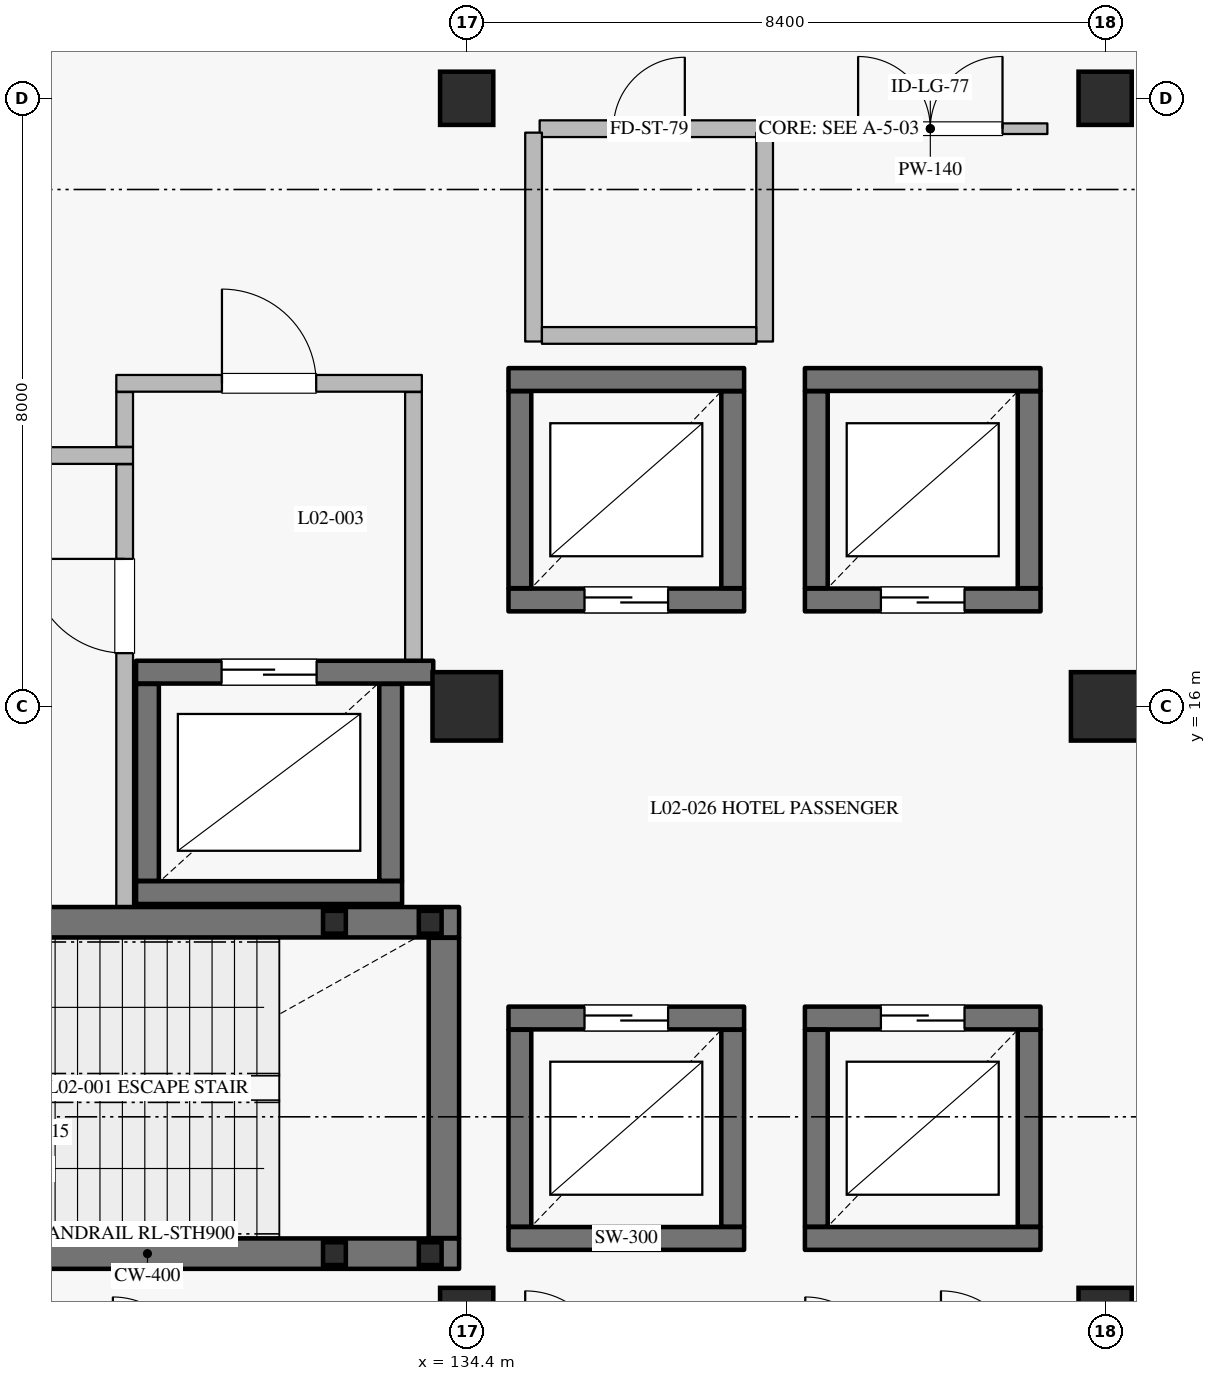
"""IFC4 building model, lengths in metres.
Left out: names, types, materials, properties, quantities, classifications, styles, units other than length and angle.
Written with IfcOpenShell. Run it as: python <this file> out.ifc"""

import sys

from ifc_helpers import new_model, si_unit, direction, frame, frame_2d, origin, origin_2d, place, context, subcontext, project, spatial, rectangle, hollow_rectangle, extrude, element, fill, save


model = new_model("IFC4")
c1 = context("Model", 3, precision=1e-05, world=origin(), true_north=direction((0.0, 1.0)))
c2 = subcontext(c1, "Body", "Model", "MODEL_VIEW")
j1 = project(units=[si_unit("LENGTHUNIT", "METRE"), si_unit("PLANEANGLEUNIT", "RADIAN")], contexts=[c1])
p1 = place(None, origin())
s1 = spatial("IfcSite", under=j1, at=p1, CompositionType="ELEMENT")
p2 = place(p1, origin())
s2 = spatial("IfcBuilding", under=s1, at=p2, CompositionType="ELEMENT")
p3 = place(p2, frame((0.0, 0.0, 11.4)))
s3 = spatial("IfcBuildingStorey", under=s2, at=p3, CompositionType="ELEMENT", Elevation=11.4)
for number, where, z_axis, x_axis in (
    (1, (134.4, 16.0, 0.0), (0.0, 0.0, 1.0), (1.0, 0.0, 0.0)),
    (2, (142.8, 16.0, 0.0), (0.0, 0.0, 1.0), (1.0, 0.0, 0.0)),
):
    element("IfcColumn", number, at=place(p3, frame(where, z_axis=z_axis, x_axis=x_axis)), inside=s3, PredefinedType="COLUMN", context=c2, shape_type="SweptSolid", body=[
        extrude(rectangle(XDim=0.9, YDim=0.9, at=origin_2d()), origin(), (0.0, 0.0, 1.0), 4.8),
    ])
for number, where, z_axis, x_axis in (
    (3, (134.4, 8.0, 0.0), (0.0, 0.0, 1.0), (1.0, 0.0, 0.0)),
    (4, (134.4, 24.0, 0.0), (0.0, 0.0, 1.0), (1.0, 0.0, 0.0)),
    (5, (142.8, 8.0, 0.0), (0.0, 0.0, 1.0), (1.0, 0.0, 0.0)),
    (6, (142.8, 24.0, 0.0), (0.0, 0.0, 1.0), (1.0, 0.0, 0.0)),
):
    element("IfcColumn", number, at=place(p3, frame(where, z_axis=z_axis, x_axis=x_axis)), inside=s3, PredefinedType="COLUMN", context=c2, shape_type="SweptSolid", body=[
        extrude(rectangle(XDim=0.7, YDim=0.7, at=origin_2d()), origin(), (0.0, 0.0, 1.0), 4.8),
    ])
p4 = place(p3, frame((134.95, 17.4, 0.0), z_axis=(0.0, 0.0, 1.0), x_axis=(1.0, 0.0, 0.0)))
e7 = element("IfcWall", 7, at=p4, inside=s3, PredefinedType="SHEAR", context=c2, shape_type="SweptSolid", body=[
    extrude(rectangle(XDim=3.1, YDim=0.3, at=frame_2d((1.55, 0.0))), origin(), (0.0, 0.0, 1.0), 4.535),
])
p5 = place(p4, frame((1.0, 0.0, 0.0)))
e8 = element("IfcOpeningElement", 8, at=p5, cuts=e7, PredefinedType="OPENING", context=c2, shape_type="SweptSolid", body=[
    extrude(rectangle(XDim=1.1, YDim=2.2, at=frame_2d((0.55, 1.1))), frame((0.0, 0.16, 0.0), z_axis=(0.0, -1.0, 0.0), x_axis=(1.0, 0.0, 0.0)), (0.0, 0.0, 1.0), 0.32),
])
p6 = place(p3, frame((137.9, 17.555, 0.0), z_axis=(0.0, 0.0, 1.0), x_axis=(0.0, 1.0, 0.0)))
e9 = element("IfcWall", 9, at=p6, inside=s3, PredefinedType="SHEAR", context=c2, shape_type="SweptSolid", body=[
    extrude(rectangle(XDim=2.59, YDim=0.3, at=frame_2d((1.295, 0.0))), origin(), (0.0, 0.0, 1.0), 4.535),
])
p7 = place(p3, frame((138.05, 20.3, 0.0), z_axis=(0.0, 0.0, 1.0), x_axis=(-1.0, 0.0, 0.0)))
e10 = element("IfcWall", 10, at=p7, inside=s3, PredefinedType="SHEAR", context=c2, shape_type="SweptSolid", body=[
    extrude(rectangle(XDim=3.1, YDim=0.3, at=frame_2d((1.55, 0.0))), origin(), (0.0, 0.0, 1.0), 4.535),
])
p8 = place(p3, frame((135.1, 20.145, 0.0), z_axis=(0.0, 0.0, 1.0), x_axis=(0.0, -1.0, 0.0)))
e11 = element("IfcWall", 11, at=p8, inside=s3, PredefinedType="SHEAR", context=c2, shape_type="SweptSolid", body=[
    extrude(rectangle(XDim=2.59, YDim=0.3, at=frame_2d((1.295, 0.0))), origin(), (0.0, 0.0, 1.0), 4.535),
])
p9 = place(p3, frame((138.85, 17.4, 0.0), z_axis=(0.0, 0.0, 1.0), x_axis=(1.0, 0.0, 0.0)))
e12 = element("IfcWall", 12, at=p9, inside=s3, PredefinedType="SHEAR", context=c2, shape_type="SweptSolid", body=[
    extrude(rectangle(XDim=3.1, YDim=0.3, at=frame_2d((1.55, 0.0))), origin(), (0.0, 0.0, 1.0), 4.535),
])
p10 = place(p9, frame((1.0, 0.0, 0.0)))
e13 = element("IfcOpeningElement", 13, at=p10, cuts=e12, PredefinedType="OPENING", context=c2, shape_type="SweptSolid", body=[
    extrude(rectangle(XDim=1.1, YDim=2.2, at=frame_2d((0.55, 1.1))), frame((0.0, 0.16, 0.0), z_axis=(0.0, -1.0, 0.0), x_axis=(1.0, 0.0, 0.0)), (0.0, 0.0, 1.0), 0.32),
])
p11 = place(p3, frame((141.8, 17.555, 0.0), z_axis=(0.0, 0.0, 1.0), x_axis=(0.0, 1.0, 0.0)))
e14 = element("IfcWall", 14, at=p11, inside=s3, PredefinedType="SHEAR", context=c2, shape_type="SweptSolid", body=[
    extrude(rectangle(XDim=2.59, YDim=0.3, at=frame_2d((1.295, 0.0))), origin(), (0.0, 0.0, 1.0), 4.535),
])
p12 = place(p3, frame((141.95, 20.3, 0.0), z_axis=(0.0, 0.0, 1.0), x_axis=(-1.0, 0.0, 0.0)))
e15 = element("IfcWall", 15, at=p12, inside=s3, PredefinedType="SHEAR", context=c2, shape_type="SweptSolid", body=[
    extrude(rectangle(XDim=3.1, YDim=0.3, at=frame_2d((1.55, 0.0))), origin(), (0.0, 0.0, 1.0), 4.535),
])
p13 = place(p3, frame((139.0, 20.145, 0.0), z_axis=(0.0, 0.0, 1.0), x_axis=(0.0, -1.0, 0.0)))
e16 = element("IfcWall", 16, at=p13, inside=s3, PredefinedType="SHEAR", context=c2, shape_type="SweptSolid", body=[
    extrude(rectangle(XDim=2.59, YDim=0.3, at=frame_2d((1.295, 0.0))), origin(), (0.0, 0.0, 1.0), 4.535),
])
p14 = place(p3, frame((134.95, 9.0, 0.0), z_axis=(0.0, 0.0, 1.0), x_axis=(1.0, 0.0, 0.0)))
e17 = element("IfcWall", 17, at=p14, inside=s3, PredefinedType="SHEAR", context=c2, shape_type="SweptSolid", body=[
    extrude(rectangle(XDim=3.1, YDim=0.3, at=frame_2d((1.55, 0.0))), origin(), (0.0, 0.0, 1.0), 4.535),
])
p15 = place(p3, frame((137.9, 9.155, 0.0), z_axis=(0.0, 0.0, 1.0), x_axis=(0.0, 1.0, 0.0)))
e18 = element("IfcWall", 18, at=p15, inside=s3, PredefinedType="SHEAR", context=c2, shape_type="SweptSolid", body=[
    extrude(rectangle(XDim=2.59, YDim=0.3, at=frame_2d((1.295, 0.0))), origin(), (0.0, 0.0, 1.0), 4.535),
])
p16 = place(p3, frame((138.05, 11.9, 0.0), z_axis=(0.0, 0.0, 1.0), x_axis=(-1.0, 0.0, 0.0)))
e19 = element("IfcWall", 19, at=p16, inside=s3, PredefinedType="SHEAR", context=c2, shape_type="SweptSolid", body=[
    extrude(rectangle(XDim=3.1, YDim=0.3, at=frame_2d((1.55, 0.0))), origin(), (0.0, 0.0, 1.0), 4.535),
])
p17 = place(p16, frame((1.0, 0.0, 0.0)))
e20 = element("IfcOpeningElement", 20, at=p17, cuts=e19, PredefinedType="OPENING", context=c2, shape_type="SweptSolid", body=[
    extrude(rectangle(XDim=1.1, YDim=2.2, at=frame_2d((0.55, 1.1))), frame((0.0, 0.16, 0.0), z_axis=(0.0, -1.0, 0.0), x_axis=(1.0, 0.0, 0.0)), (0.0, 0.0, 1.0), 0.32),
])
p18 = place(p3, frame((135.1, 11.745, 0.0), z_axis=(0.0, 0.0, 1.0), x_axis=(0.0, -1.0, 0.0)))
e21 = element("IfcWall", 21, at=p18, inside=s3, PredefinedType="SHEAR", context=c2, shape_type="SweptSolid", body=[
    extrude(rectangle(XDim=2.59, YDim=0.3, at=frame_2d((1.295, 0.0))), origin(), (0.0, 0.0, 1.0), 4.535),
])
p19 = place(p3, frame((138.85, 9.0, 0.0), z_axis=(0.0, 0.0, 1.0), x_axis=(1.0, 0.0, 0.0)))
e22 = element("IfcWall", 22, at=p19, inside=s3, PredefinedType="SHEAR", context=c2, shape_type="SweptSolid", body=[
    extrude(rectangle(XDim=3.1, YDim=0.3, at=frame_2d((1.55, 0.0))), origin(), (0.0, 0.0, 1.0), 4.535),
])
p20 = place(p3, frame((141.8, 9.155, 0.0), z_axis=(0.0, 0.0, 1.0), x_axis=(0.0, 1.0, 0.0)))
e23 = element("IfcWall", 23, at=p20, inside=s3, PredefinedType="SHEAR", context=c2, shape_type="SweptSolid", body=[
    extrude(rectangle(XDim=2.59, YDim=0.3, at=frame_2d((1.295, 0.0))), origin(), (0.0, 0.0, 1.0), 4.535),
])
p21 = place(p3, frame((141.95, 11.9, 0.0), z_axis=(0.0, 0.0, 1.0), x_axis=(-1.0, 0.0, 0.0)))
e24 = element("IfcWall", 24, at=p21, inside=s3, PredefinedType="SHEAR", context=c2, shape_type="SweptSolid", body=[
    extrude(rectangle(XDim=3.1, YDim=0.3, at=frame_2d((1.55, 0.0))), origin(), (0.0, 0.0, 1.0), 4.535),
])
p22 = place(p21, frame((1.0, 0.0, 0.0)))
e25 = element("IfcOpeningElement", 25, at=p22, cuts=e24, PredefinedType="OPENING", context=c2, shape_type="SweptSolid", body=[
    extrude(rectangle(XDim=1.1, YDim=2.2, at=frame_2d((0.55, 1.1))), frame((0.0, 0.16, 0.0), z_axis=(0.0, -1.0, 0.0), x_axis=(1.0, 0.0, 0.0)), (0.0, 0.0, 1.0), 0.32),
])
p23 = place(p3, frame((139.0, 11.745, 0.0), z_axis=(0.0, 0.0, 1.0), x_axis=(0.0, -1.0, 0.0)))
e26 = element("IfcWall", 26, at=p23, inside=s3, PredefinedType="SHEAR", context=c2, shape_type="SweptSolid", body=[
    extrude(rectangle(XDim=2.59, YDim=0.3, at=frame_2d((1.295, 0.0))), origin(), (0.0, 0.0, 1.0), 4.535),
])
p24 = place(p3, frame((130.05, 13.55, 0.0), z_axis=(0.0, 0.0, 1.0), x_axis=(1.0, 0.0, 0.0)))
e27 = element("IfcWall", 27, at=p24, inside=s3, PredefinedType="SHEAR", context=c2, shape_type="SweptSolid", body=[
    extrude(rectangle(XDim=3.5, YDim=0.3, at=frame_2d((1.75, 0.0))), origin(), (0.0, 0.0, 1.0), 4.535),
])
p25 = place(p3, frame((133.4, 13.705, 0.0), z_axis=(0.0, 0.0, 1.0), x_axis=(0.0, 1.0, 0.0)))
e28 = element("IfcWall", 28, at=p25, inside=s3, PredefinedType="SHEAR", context=c2, shape_type="SweptSolid", body=[
    extrude(rectangle(XDim=2.59, YDim=0.3, at=frame_2d((1.295, 0.0))), origin(), (0.0, 0.0, 1.0), 4.535),
])
p26 = place(p3, frame((133.96, 16.45, 0.0), z_axis=(0.0, 0.0, 1.0), x_axis=(-1.0, 0.0, 0.0)))
e29 = element("IfcWall", 29, at=p26, inside=s3, PredefinedType="SHEAR", context=c2, shape_type="SweptSolid", body=[
    extrude(rectangle(XDim=3.91, YDim=0.3, at=frame_2d((1.955, 0.0))), origin(), (0.0, 0.0, 1.0), 4.535),
])
p27 = place(p26, frame((1.535, 0.0, 0.0)))
e30 = element("IfcOpeningElement", 30, at=p27, cuts=e29, PredefinedType="OPENING", context=c2, shape_type="SweptSolid", body=[
    extrude(rectangle(XDim=1.25, YDim=2.25, at=frame_2d((0.625, 1.125))), frame((0.0, 0.16, 0.0), z_axis=(0.0, -1.0, 0.0), x_axis=(1.0, 0.0, 0.0)), (0.0, 0.0, 1.0), 0.32),
])
p28 = place(p3, frame((130.2, 16.295, 0.0), z_axis=(0.0, 0.0, 1.0), x_axis=(0.0, -1.0, 0.0)))
e31 = element("IfcWall", 31, at=p28, inside=s3, PredefinedType="SHEAR", context=c2, shape_type="SweptSolid", body=[
    extrude(rectangle(XDim=2.59, YDim=0.3, at=frame_2d((1.295, 0.0))), origin(), (0.0, 0.0, 1.0), 4.535),
])
p29 = place(p3, frame((126.1, 8.8, 0.0), z_axis=(0.0, 0.0, 1.0), x_axis=(1.0, 0.0, 0.0)))
e32 = element("IfcWall", 32, at=p29, inside=s3, PredefinedType="SHEAR", context=c2, shape_type="SweptSolid", body=[
    extrude(rectangle(XDim=8.2, YDim=0.4, at=frame_2d((4.1, 0.0))), origin(), (0.0, 0.0, 1.0), 4.535),
])
p30 = place(p3, frame((134.1, 9.005, 0.0), z_axis=(0.0, 0.0, 1.0), x_axis=(0.0, 1.0, 0.0)))
e33 = element("IfcWall", 33, at=p30, inside=s3, PredefinedType="SHEAR", context=c2, shape_type="SweptSolid", body=[
    extrude(rectangle(XDim=3.95, YDim=0.4, at=frame_2d((1.975, 0.0))), origin(), (0.0, 0.0, 1.0), 4.535),
])
p31 = place(p3, frame((126.1, 13.16, 0.0), z_axis=(0.0, 0.0, 1.0), x_axis=(1.0, 0.0, 0.0)))
e34 = element("IfcWall", 34, at=p31, inside=s3, PredefinedType="SHEAR", context=c2, shape_type="SweptSolid", body=[
    extrude(rectangle(XDim=8.2, YDim=0.4, at=frame_2d((4.1, 0.0))), origin(), (0.0, 0.0, 1.0), 4.535),
])
p32 = place(p31, frame((0.43, 0.0, 0.0)))
e35 = element("IfcOpeningElement", 35, at=p32, cuts=e34, PredefinedType="OPENING", context=c2, shape_type="SweptSolid", body=[
    extrude(rectangle(XDim=1.16, YDim=2.2, at=frame_2d((0.58, 1.1))), frame((0.0, 0.21, 0.0), z_axis=(0.0, -1.0, 0.0), x_axis=(1.0, 0.0, 0.0)), (0.0, 0.0, 1.0), 0.42),
])
p33 = place(p3, frame((126.19, 19.3, 0.0), z_axis=(0.0, 0.0, 1.0), x_axis=(1.0, 0.0, 0.0)))
e36 = element("IfcWall", 36, at=p33, inside=s3, PredefinedType="PARTITIONING", context=c2, shape_type="SweptSolid", body=[
    extrude(rectangle(XDim=3.82, YDim=0.22, at=frame_2d((1.91, 0.0))), origin(), (0.0, 0.0, 1.0), 4.535),
])
p34 = place(p33, frame((1.35, 0.0, 0.0)))
e37 = element("IfcOpeningElement", 37, at=p34, cuts=e36, PredefinedType="OPENING", context=c2, shape_type="SweptSolid", body=[
    extrude(rectangle(XDim=1.12, YDim=2.2, at=frame_2d((0.56, 1.1))), frame((0.0, 0.12, 0.0), z_axis=(0.0, -1.0, 0.0), x_axis=(1.0, 0.0, 0.0)), (0.0, 0.0, 1.0), 0.24),
])
p35 = place(p3, frame((129.9, 13.365, 0.0), z_axis=(0.0, 0.0, 1.0), x_axis=(0.0, 1.0, 0.0)))
e38 = element("IfcWall", 38, at=p35, inside=s3, PredefinedType="PARTITIONING", context=c2, shape_type="SweptSolid", body=[
    extrude(rectangle(XDim=5.82, YDim=0.22, at=frame_2d((2.91, 0.0))), origin(), (0.0, 0.0, 1.0), 4.535),
])
p36 = place(p35, frame((3.335, 0.0, 0.0)))
e39 = element("IfcOpeningElement", 39, at=p36, cuts=e38, PredefinedType="OPENING", context=c2, shape_type="SweptSolid", body=[
    extrude(rectangle(XDim=1.24, YDim=2.2, at=frame_2d((0.62, 1.1))), frame((0.0, 0.12, 0.0), z_axis=(0.0, -1.0, 0.0), x_axis=(1.0, 0.0, 0.0)), (0.0, 0.0, 1.0), 0.24),
])
p37 = place(p3, frame((129.9, 19.415, 0.0), z_axis=(0.0, 0.0, 1.0), x_axis=(0.0, 1.0, 0.0)))
e40 = element("IfcWall", 40, at=p37, inside=s3, PredefinedType="PARTITIONING", context=c2, shape_type="SweptSolid", body=[
    extrude(rectangle(XDim=0.72, YDim=0.22, at=frame_2d((0.36, 0.0))), origin(), (0.0, 0.0, 1.0), 4.535),
])
p38 = place(p3, frame((133.7, 16.605, 0.0), z_axis=(0.0, 0.0, 1.0), x_axis=(0.0, 1.0, 0.0)))
e41 = element("IfcWall", 41, at=p38, inside=s3, PredefinedType="PARTITIONING", context=c2, shape_type="SweptSolid", body=[
    extrude(rectangle(XDim=3.53, YDim=0.22, at=frame_2d((1.765, 0.0))), origin(), (0.0, 0.0, 1.0), 4.535),
])
p39 = place(p3, frame((129.79, 20.25, 0.0), z_axis=(0.0, 0.0, 1.0), x_axis=(1.0, 0.0, 0.0)))
e42 = element("IfcWall", 42, at=p39, inside=s3, PredefinedType="PARTITIONING", context=c2, shape_type="SweptSolid", body=[
    extrude(rectangle(XDim=4.02, YDim=0.22, at=frame_2d((2.01, 0.0))), origin(), (0.0, 0.0, 1.0), 4.535),
])
p40 = place(p39, frame((1.39, 0.0, 0.0)))
e43 = element("IfcOpeningElement", 43, at=p40, cuts=e42, PredefinedType="OPENING", context=c2, shape_type="SweptSolid", body=[
    extrude(rectangle(XDim=1.24, YDim=2.2, at=frame_2d((0.62, 1.1))), frame((0.0, 0.12, 0.0), z_axis=(0.0, -1.0, 0.0), x_axis=(1.0, 0.0, 0.0)), (0.0, 0.0, 1.0), 0.24),
])
for number, where, z_axis, x_axis in (
    (44, (132.66, 8.8, -2.7), (0.0, 0.0, 1.0), (1.0, 0.0, 0.0)),
    (45, (132.66, 13.16, -2.7), (0.0, 0.0, 1.0), (1.0, 0.0, 0.0)),
    (46, (133.92, 8.8, -2.7), (0.0, 0.0, 1.0), (1.0, 0.0, 0.0)),
    (47, (133.92, 13.16, -2.7), (0.0, 0.0, 1.0), (1.0, 0.0, 0.0)),
):
    element("IfcColumn", number, at=place(p3, frame(where, z_axis=z_axis, x_axis=x_axis)), inside=s3, PredefinedType="COLUMN", context=c2, shape_type="SweptSolid", body=[
        extrude(hollow_rectangle(XDim=0.3, YDim=0.3, WallThickness=0.012, at=origin_2d()), origin(), (0.0, 0.0, 1.0), 4.92),
    ])
p41 = place(p3, frame((138.96, 23.6, 0.0), z_axis=(0.0, 0.0, 1.0), x_axis=(1.0, 0.0, 0.0)))
e48 = element("IfcWall", 48, at=p41, inside=s3, PredefinedType="PARTITIONING", context=c2, shape_type="SweptSolid", body=[
    extrude(rectangle(XDim=3.08, YDim=0.14, at=frame_2d((1.54, 0.0))), origin(), (0.0, 0.0, 1.0), 4.535),
])
p42 = place(p41, frame((0.59, 0.0, 0.0)))
e49 = element("IfcOpeningElement", 49, at=p42, cuts=e48, PredefinedType="OPENING", context=c2, shape_type="SweptSolid", body=[
    extrude(rectangle(XDim=1.9, YDim=2.4, at=frame_2d((0.95, 1.2))), frame((0.0, 0.08, 0.0), z_axis=(0.0, -1.0, 0.0), x_axis=(1.0, 0.0, 0.0)), (0.0, 0.0, 1.0), 0.16),
])
p43 = place(p3, frame((135.36, 23.6, 0.0), z_axis=(0.0, 0.0, 1.0), x_axis=(1.0, 0.0, 0.0)))
e50 = element("IfcWall", 50, at=p43, inside=s3, PredefinedType="PARTITIONING", context=c2, shape_type="SweptSolid", body=[
    extrude(rectangle(XDim=2.88, YDim=0.22, at=frame_2d((1.44, 0.0))), origin(), (0.0, 0.0, 1.0), 4.535),
])
p44 = place(p43, frame((0.97, 0.0, 0.0)))
e51 = element("IfcOpeningElement", 51, at=p44, cuts=e50, PredefinedType="OPENING", context=c2, shape_type="SweptSolid", body=[
    extrude(rectangle(XDim=0.94, YDim=2.15, at=frame_2d((0.47, 1.075))), frame((0.0, 0.12, 0.0), z_axis=(0.0, -1.0, 0.0), x_axis=(1.0, 0.0, 0.0)), (0.0, 0.0, 1.0), 0.24),
])
for number, where, z_axis, x_axis in (
    (52, (135.28, 20.8, 0.0), (0.0, 0.0, 1.0), (0.0, 1.0, 0.0)),
    (53, (138.32, 20.8, 0.0), (0.0, 0.0, 1.0), (0.0, 1.0, 0.0)),
):
    element("IfcWall", number, at=place(p3, frame(where, z_axis=z_axis, x_axis=x_axis)), inside=s3, PredefinedType="PARTITIONING", context=c2, shape_type="SweptSolid", body=[
        extrude(rectangle(XDim=2.748, YDim=0.22, at=frame_2d((1.374, 0.0))), origin(), (0.0, 0.0, 1.0), 4.535),
    ])
p45 = place(p3, frame((135.39, 20.88, 0.0), z_axis=(0.0, 0.0, 1.0), x_axis=(1.0, 0.0, 0.0)))
e54 = element("IfcWall", 54, at=p45, inside=s3, PredefinedType="PARTITIONING", context=c2, shape_type="SweptSolid", body=[
    extrude(rectangle(XDim=2.82, YDim=0.22, at=frame_2d((1.41, 0.0))), origin(), (0.0, 0.0, 1.0), 4.535),
])
p46 = place(p5, origin())
e55 = element("IfcDoor", 55, at=p46, inside=s3, OperationType="DOUBLE_DOOR_SLIDING", PredefinedType="DOOR", context=c2, shape_type="SweptSolid", body=[
    extrude(rectangle(XDim=1.1, YDim=2.2, at=frame_2d((0.55, 1.1))), frame((0.0, 0.025, 0.0), z_axis=(0.0, -1.0, 0.0), x_axis=(1.0, 0.0, 0.0)), (0.0, 0.0, 1.0), 0.05),
])
fill(e8, e55)
p47 = place(p10, origin())
e56 = element("IfcDoor", 56, at=p47, inside=s3, OperationType="DOUBLE_DOOR_SLIDING", PredefinedType="DOOR", context=c2, shape_type="SweptSolid", body=[
    extrude(rectangle(XDim=1.1, YDim=2.2, at=frame_2d((0.55, 1.1))), frame((0.0, 0.025, 0.0), z_axis=(0.0, -1.0, 0.0), x_axis=(1.0, 0.0, 0.0)), (0.0, 0.0, 1.0), 0.05),
])
fill(e13, e56)
p48 = place(p17, origin())
e57 = element("IfcDoor", 57, at=p48, inside=s3, OperationType="DOUBLE_DOOR_SLIDING", PredefinedType="DOOR", context=c2, shape_type="SweptSolid", body=[
    extrude(rectangle(XDim=1.1, YDim=2.2, at=frame_2d((0.55, 1.1))), frame((0.0, 0.025, 0.0), z_axis=(0.0, -1.0, 0.0), x_axis=(1.0, 0.0, 0.0)), (0.0, 0.0, 1.0), 0.05),
])
fill(e20, e57)
p49 = place(p22, origin())
e58 = element("IfcDoor", 58, at=p49, inside=s3, OperationType="DOUBLE_DOOR_SLIDING", PredefinedType="DOOR", context=c2, shape_type="SweptSolid", body=[
    extrude(rectangle(XDim=1.1, YDim=2.2, at=frame_2d((0.55, 1.1))), frame((0.0, 0.025, 0.0), z_axis=(0.0, -1.0, 0.0), x_axis=(1.0, 0.0, 0.0)), (0.0, 0.0, 1.0), 0.05),
])
fill(e25, e58)
p50 = place(p27, origin())
e59 = element("IfcDoor", 59, at=p50, inside=s3, OperationType="DOUBLE_DOOR_SLIDING", PredefinedType="DOOR", context=c2, shape_type="SweptSolid", body=[
    extrude(rectangle(XDim=1.25, YDim=2.25, at=frame_2d((0.625, 1.125))), frame((0.0, 0.025, 0.0), z_axis=(0.0, -1.0, 0.0), x_axis=(1.0, 0.0, 0.0)), (0.0, 0.0, 1.0), 0.05),
])
fill(e30, e59)
p51 = place(p36, origin())
e60 = element("IfcDoor", 60, at=p51, inside=s3, OperationType="SINGLE_SWING_RIGHT", PredefinedType="DOOR", context=c2, shape_type="SweptSolid", body=[
    extrude(rectangle(XDim=1.24, YDim=2.2, at=frame_2d((0.62, 1.1))), frame((0.0, 0.025, 0.0), z_axis=(0.0, -1.0, 0.0), x_axis=(1.0, 0.0, 0.0)), (0.0, 0.0, 1.0), 0.05),
])
fill(e39, e60)
p52 = place(p40, origin())
e61 = element("IfcDoor", 61, at=p52, inside=s3, OperationType="SINGLE_SWING_LEFT", PredefinedType="DOOR", context=c2, shape_type="SweptSolid", body=[
    extrude(rectangle(XDim=1.24, YDim=2.2, at=frame_2d((0.62, 1.1))), frame((0.0, 0.025, 0.0), z_axis=(0.0, -1.0, 0.0), x_axis=(1.0, 0.0, 0.0)), (0.0, 0.0, 1.0), 0.05),
])
fill(e43, e61)
p53 = place(p42, origin())
e62 = element("IfcDoor", 62, at=p53, inside=s3, OperationType="DOUBLE_DOOR_SINGLE_SWING", PredefinedType="DOOR", context=c2, shape_type="SweptSolid", body=[
    extrude(rectangle(XDim=1.9, YDim=2.4, at=frame_2d((0.95, 1.2))), frame((0.0, 0.025, 0.0), z_axis=(0.0, -1.0, 0.0), x_axis=(1.0, 0.0, 0.0)), (0.0, 0.0, 1.0), 0.05),
])
fill(e49, e62)
p54 = place(p44, origin())
e63 = element("IfcDoor", 63, at=p54, inside=s3, OperationType="SINGLE_SWING_RIGHT", PredefinedType="DOOR", context=c2, shape_type="SweptSolid", body=[
    extrude(rectangle(XDim=0.94, YDim=2.15, at=frame_2d((0.47, 1.075))), frame((0.0, 0.025, 0.0), z_axis=(0.0, -1.0, 0.0), x_axis=(1.0, 0.0, 0.0)), (0.0, 0.0, 1.0), 0.05),
])
fill(e51, e63)
save(model, sys.argv[1])
